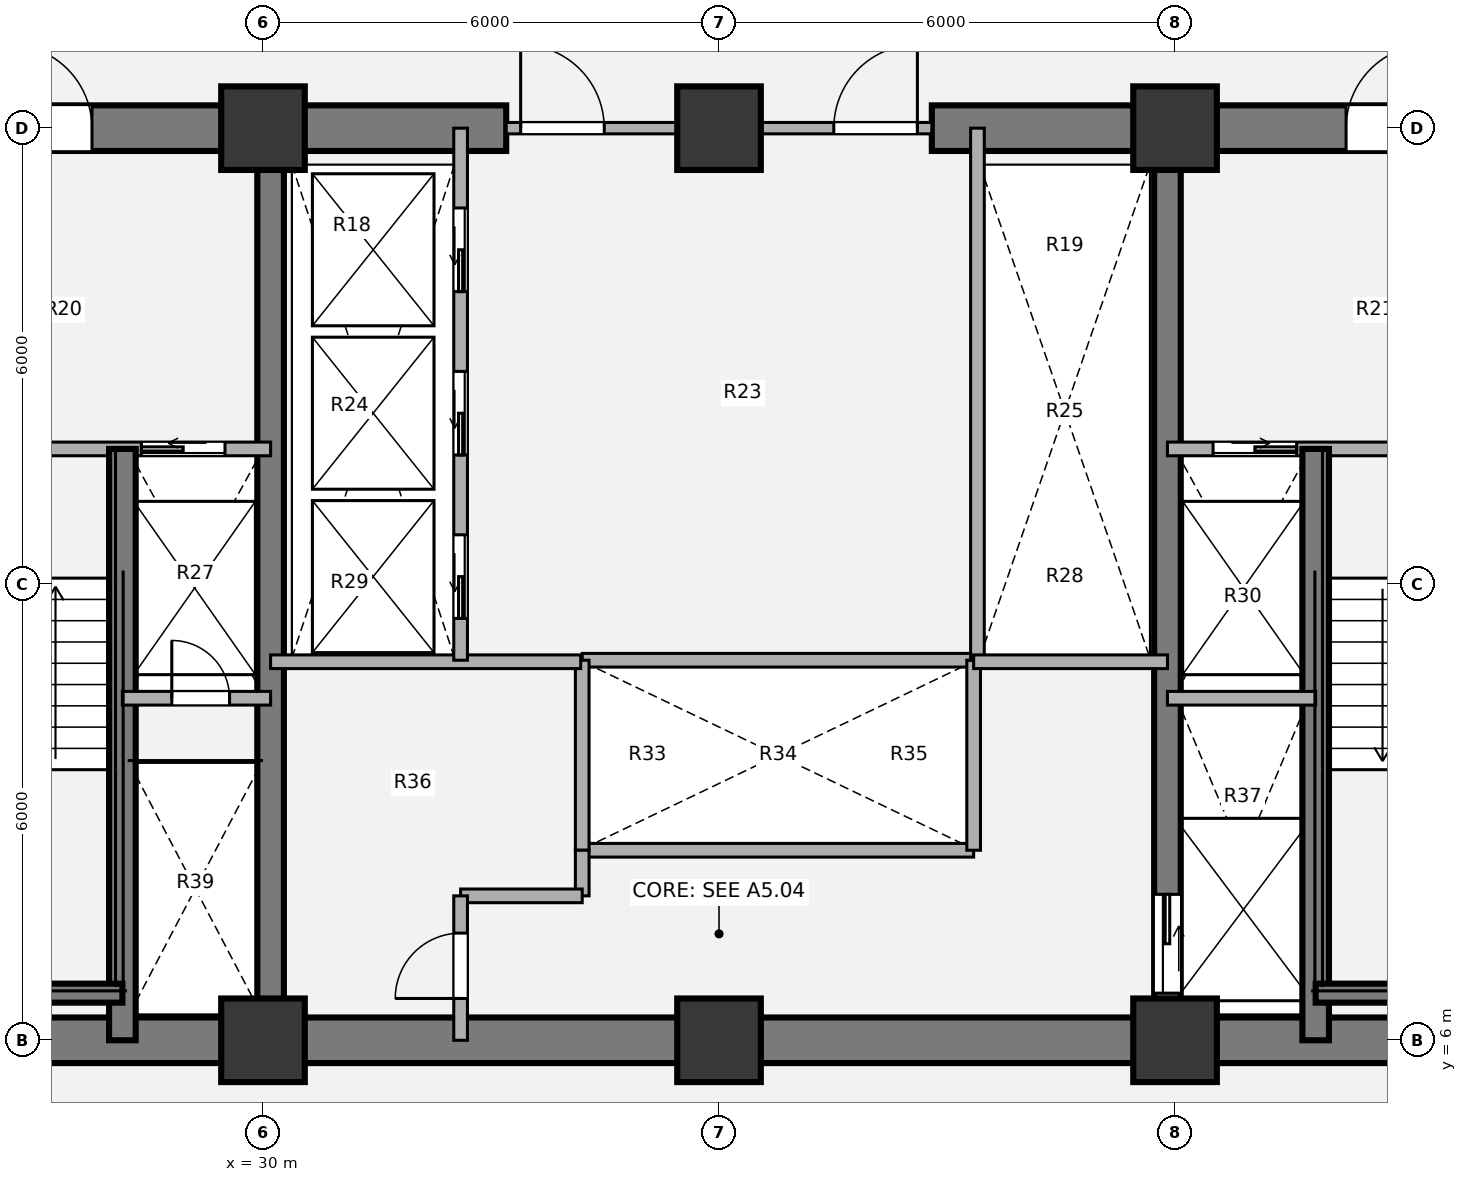
"""IFC4 building model, lengths in metres.
Left out: names, types, materials, properties, quantities, classifications, styles, units other than length and angle.
Written with IfcOpenShell. Run it as: python <this file> out.ifc"""

import sys

from ifc_helpers import new_model, si_unit, direction, frame, frame_2d, origin, origin_2d, place, context, subcontext, project, spatial, rectangle, extrude, source, transform, mapped, element, fill, save


model = new_model("IFC4")
c1 = context("Model", 3, precision=1e-05, world=origin(), true_north=direction((0.0, 1.0)))
c2 = subcontext(c1, "Body", "Model", "MODEL_VIEW")
j1 = project(units=[si_unit("LENGTHUNIT", "METRE"), si_unit("PLANEANGLEUNIT", "RADIAN")], contexts=[c1])
p1 = place(None, origin())
s1 = spatial("IfcSite", under=j1, at=p1, CompositionType="ELEMENT")
p2 = place(p1, origin())
s2 = spatial("IfcBuilding", under=s1, at=p2, CompositionType="ELEMENT")
p3 = place(p2, frame((0.0, 0.0, 76.14)))
s3 = spatial("IfcBuildingStorey", under=s2, at=p3, CompositionType="ELEMENT", Elevation=76.14)
m1 = source(origin(), c2, "Body", "SweptSolid", [
    extrude(rectangle(XDim=1.1, YDim=1.1, at=origin_2d()), origin(), (0.0, 0.0, 1.0), 3.78),
])
for number, where, z_axis, x_axis in (
    (1, (30.0, 6.0, 0.0), (0.0, 0.0, 1.0), (1.0, 0.0, 0.0)),
    (2, (36.0, 6.0, 0.0), (0.0, 0.0, 1.0), (1.0, 0.0, 0.0)),
    (3, (42.0, 6.0, 0.0), (0.0, 0.0, 1.0), (1.0, 0.0, 0.0)),
    (4, (30.0, 18.0, 0.0), (0.0, 0.0, 1.0), (1.0, 0.0, 0.0)),
    (5, (36.0, 18.0, 0.0), (0.0, 0.0, 1.0), (1.0, 0.0, 0.0)),
    (6, (42.0, 18.0, 0.0), (0.0, 0.0, 1.0), (1.0, 0.0, 0.0)),
):
    element("IfcColumn", number, at=place(p3, frame(where, z_axis=z_axis, x_axis=x_axis)), inside=s3, PredefinedType="COLUMN", context=c2, shape_type="MappedRepresentation", body=[
        mapped(m1, transform((0.0, 0.0, 0.0), x_axis=(1.0, 0.0, 0.0), y_axis=(0.0, 1.0, 0.0), z_axis=(0.0, 0.0, 1.0), scale=1.0)),
    ])
p4 = place(p3, frame((48.3, 6.0, 0.0), z_axis=(0.0, 0.0, 1.0), x_axis=(-1.0, 0.0, 0.0)))
e7 = element("IfcWall", 7, at=p4, inside=s3, PredefinedType="SHEAR", context=c2, shape_type="SweptSolid", body=[
    extrude(rectangle(XDim=24.6, YDim=0.6, at=frame_2d((12.3, 0.0))), origin(), (0.0, 0.0, 1.0), 3.78),
])
p5 = place(p3, frame((23.7, 18.0, 0.0), z_axis=(0.0, 0.0, 1.0), x_axis=(1.0, 0.0, 0.0)))
e8 = element("IfcWall", 8, at=p5, inside=s3, PredefinedType="SHEAR", context=c2, shape_type="SweptSolid", body=[
    extrude(rectangle(XDim=9.5, YDim=0.6, at=frame_2d((4.75, 0.0))), origin(), (0.0, 0.0, 1.0), 3.78),
])
p6 = place(p5, frame((2.95, 0.0, 0.0)))
e9 = element("IfcOpeningElement", 9, at=p6, cuts=e8, PredefinedType="OPENING", context=c2, shape_type="SweptSolid", body=[
    extrude(rectangle(XDim=1.1, YDim=2.1, at=origin_2d()), frame((0.55, 0.31, 1.05), z_axis=(0.0, -1.0, 0.0), x_axis=(1.0, 0.0, 0.0)), (0.0, 0.0, 1.0), 0.62),
])
p7 = place(p3, frame((38.8, 18.0, 0.0), z_axis=(0.0, 0.0, 1.0), x_axis=(1.0, 0.0, 0.0)))
e10 = element("IfcWall", 10, at=p7, inside=s3, PredefinedType="SHEAR", context=c2, shape_type="SweptSolid", body=[
    extrude(rectangle(XDim=9.5, YDim=0.6, at=frame_2d((4.75, 0.0))), origin(), (0.0, 0.0, 1.0), 3.78),
])
p8 = place(p7, frame((5.45, 0.0, 0.0)))
e11 = element("IfcOpeningElement", 11, at=p8, cuts=e10, PredefinedType="OPENING", context=c2, shape_type="SweptSolid", body=[
    extrude(rectangle(XDim=1.1, YDim=2.1, at=origin_2d()), frame((0.55, 0.31, 1.05), z_axis=(0.0, -1.0, 0.0), x_axis=(1.0, 0.0, 0.0)), (0.0, 0.0, 1.0), 0.62),
])
p9 = place(p3, frame((30.1, 6.0, 0.0), z_axis=(0.0, 0.0, 1.0), x_axis=(0.0, 1.0, 0.0)))
e12 = element("IfcWall", 12, at=p9, inside=s3, PredefinedType="SHEAR", context=c2, shape_type="SweptSolid", body=[
    extrude(rectangle(XDim=12.0, YDim=0.35, at=frame_2d((6.0, 0.0))), origin(), (0.0, 0.0, 1.0), 3.78),
])
p10 = place(p3, frame((41.9, 18.0, 0.0), z_axis=(0.0, 0.0, 1.0), x_axis=(0.0, -1.0, 0.0)))
e13 = element("IfcWall", 13, at=p10, inside=s3, PredefinedType="SHEAR", context=c2, shape_type="SweptSolid", body=[
    extrude(rectangle(XDim=12.0, YDim=0.35, at=frame_2d((6.0, 0.0))), origin(), (0.0, 0.0, 1.0), 3.78),
])
p11 = place(p10, frame((10.08, 0.0, 0.0)))
e14 = element("IfcOpeningElement", 14, at=p11, cuts=e13, PredefinedType="OPENING", context=c2, shape_type="SweptSolid", body=[
    extrude(rectangle(XDim=1.3, YDim=2.1, at=origin_2d()), frame((0.65, 0.185, 1.05), z_axis=(0.0, -1.0, 0.0), x_axis=(1.0, 0.0, 0.0)), (0.0, 0.0, 1.0), 0.37),
])
for number, where, z_axis, x_axis in (
    (15, (34.2, 11.0, 0.0), (0.0, 0.0, 1.0), (1.0, 0.0, 0.0)),
    (16, (34.2, 8.5, 0.0), (0.0, 0.0, 1.0), (1.0, 0.0, 0.0)),
):
    element("IfcWall", number, at=place(p3, frame(where, z_axis=z_axis, x_axis=x_axis)), inside=s3, PredefinedType="PARTITIONING", context=c2, shape_type="SweptSolid", body=[
        extrude(rectangle(XDim=5.15, YDim=0.18, at=frame_2d((2.575, 0.0))), origin(), (0.0, 0.0, 1.0), 3.342),
    ])
for number, where, z_axis, x_axis in (
    (17, (34.2, 8.5, 0.0), (0.0, 0.0, 1.0), (0.0, 1.0, 0.0)),
    (18, (39.35, 8.5, 0.0), (0.0, 0.0, 1.0), (0.0, 1.0, 0.0)),
):
    element("IfcWall", number, at=place(p3, frame(where, z_axis=z_axis, x_axis=x_axis)), inside=s3, PredefinedType="PARTITIONING", context=c2, shape_type="SweptSolid", body=[
        extrude(rectangle(XDim=2.5, YDim=0.18, at=frame_2d((1.25, 0.0))), origin(), (0.0, 0.0, 1.0), 3.342),
    ])
p12 = place(p3, frame((39.4, 11.0, 0.0), z_axis=(0.0, 0.0, 1.0), x_axis=(0.0, 1.0, 0.0)))
e19 = element("IfcWall", 19, at=p12, inside=s3, PredefinedType="PARTITIONING", context=c2, shape_type="SweptSolid", body=[
    extrude(rectangle(XDim=7.0, YDim=0.18, at=frame_2d((3.5, 0.0))), origin(), (0.0, 0.0, 1.0), 3.342),
])
p13 = place(p3, frame((30.1, 10.98, 0.0), z_axis=(0.0, 0.0, 1.0), x_axis=(1.0, 0.0, 0.0)))
e20 = element("IfcWall", 20, at=p13, inside=s3, PredefinedType="PARTITIONING", context=c2, shape_type="SweptSolid", body=[
    extrude(rectangle(XDim=4.08, YDim=0.18, at=frame_2d((2.04, 0.0))), origin(), (0.0, 0.0, 1.0), 3.342),
])
p14 = place(p3, frame((34.2, 7.9, 0.0), z_axis=(0.0, 0.0, 1.0), x_axis=(0.0, 1.0, 0.0)))
e21 = element("IfcWall", 21, at=p14, inside=s3, PredefinedType="PARTITIONING", context=c2, shape_type="SweptSolid", body=[
    extrude(rectangle(XDim=0.6, YDim=0.18, at=frame_2d((0.3, 0.0))), origin(), (0.0, 0.0, 1.0), 3.342),
])
p15 = place(p3, frame((32.6, 7.9, 0.0), z_axis=(0.0, 0.0, 1.0), x_axis=(1.0, 0.0, 0.0)))
e22 = element("IfcWall", 22, at=p15, inside=s3, PredefinedType="PARTITIONING", context=c2, shape_type="SweptSolid", body=[
    extrude(rectangle(XDim=1.6, YDim=0.18, at=frame_2d((0.8, 0.0))), origin(), (0.0, 0.0, 1.0), 3.342),
])
p16 = place(p3, frame((32.6, 6.0, 0.0), z_axis=(0.0, 0.0, 1.0), x_axis=(0.0, 1.0, 0.0)))
e23 = element("IfcWall", 23, at=p16, inside=s3, PredefinedType="PARTITIONING", context=c2, shape_type="SweptSolid", body=[
    extrude(rectangle(XDim=1.9, YDim=0.18, at=frame_2d((0.95, 0.0))), origin(), (0.0, 0.0, 1.0), 3.342),
])
p17 = place(p16, frame((0.55, 0.0, 0.0)))
e24 = element("IfcOpeningElement", 24, at=p17, cuts=e23, PredefinedType="OPENING", context=c2, shape_type="SweptSolid", body=[
    extrude(rectangle(XDim=0.86, YDim=2.1, at=origin_2d()), frame((0.43, 0.1, 1.05), z_axis=(0.0, -1.0, 0.0), x_axis=(1.0, 0.0, 0.0)), (0.0, 0.0, 1.0), 0.2),
])
p18 = place(p3, frame((39.35, 10.98, 0.0), z_axis=(0.0, 0.0, 1.0), x_axis=(1.0, 0.0, 0.0)))
e25 = element("IfcWall", 25, at=p18, inside=s3, PredefinedType="PARTITIONING", context=c2, shape_type="SweptSolid", body=[
    extrude(rectangle(XDim=2.55, YDim=0.18, at=frame_2d((1.275, 0.0))), origin(), (0.0, 0.0, 1.0), 3.342),
])
p19 = place(p3, frame((33.2, 18.0, 0.0), z_axis=(0.0, 0.0, 1.0), x_axis=(1.0, 0.0, 0.0)))
e26 = element("IfcWall", 26, at=p19, inside=s3, PredefinedType="PARTITIONING", context=c2, shape_type="SweptSolid", body=[
    extrude(rectangle(XDim=5.6, YDim=0.15, at=frame_2d((2.8, 0.0))), origin(), (0.0, 0.0, 1.0), 2.157),
])
p20 = place(p19, frame((0.19, 0.0, 0.0)))
e27 = element("IfcOpeningElement", 27, at=p20, cuts=e26, PredefinedType="OPENING", context=c2, shape_type="SweptSolid", body=[
    extrude(rectangle(XDim=1.1, YDim=2.097, at=origin_2d()), frame((0.55, 0.085, 1.048), z_axis=(0.0, -1.0, 0.0), x_axis=(1.0, 0.0, 0.0)), (0.0, 0.0, 1.0), 0.17),
])
p21 = place(p19, frame((4.31, 0.0, 0.0)))
e28 = element("IfcOpeningElement", 28, at=p21, cuts=e26, PredefinedType="OPENING", context=c2, shape_type="SweptSolid", body=[
    extrude(rectangle(XDim=1.1, YDim=2.097, at=origin_2d()), frame((0.55, 0.085, 1.048), z_axis=(0.0, -1.0, 0.0), x_axis=(1.0, 0.0, 0.0)), (0.0, 0.0, 1.0), 0.17),
])
p22 = place(p3, frame((24.0, 13.78, 0.0), z_axis=(0.0, 0.0, 1.0), x_axis=(1.0, 0.0, 0.0)))
e29 = element("IfcWall", 29, at=p22, inside=s3, PredefinedType="PARTITIONING", context=c2, shape_type="SweptSolid", body=[
    extrude(rectangle(XDim=6.1, YDim=0.18, at=frame_2d((3.05, 0.0))), origin(), (0.0, 0.0, 1.0), 3.342),
])
p23 = place(p22, frame((1.15, 0.0, 0.0)))
e30 = element("IfcOpeningElement", 30, at=p23, cuts=e29, PredefinedType="OPENING", context=c2, shape_type="SweptSolid", body=[
    extrude(rectangle(XDim=1.1, YDim=2.1, at=origin_2d()), frame((0.55, 0.1, 1.05), z_axis=(0.0, -1.0, 0.0), x_axis=(1.0, 0.0, 0.0)), (0.0, 0.0, 1.0), 0.2),
])
p24 = place(p22, frame((4.4, 0.0, 0.0)))
e31 = element("IfcOpeningElement", 31, at=p24, cuts=e29, PredefinedType="OPENING", context=c2, shape_type="SweptSolid", body=[
    extrude(rectangle(XDim=1.1, YDim=2.1, at=origin_2d()), frame((0.55, 0.1, 1.05), z_axis=(0.0, -1.0, 0.0), x_axis=(1.0, 0.0, 0.0)), (0.0, 0.0, 1.0), 0.2),
])
p25 = place(p3, frame((28.15, 6.0, 0.0), z_axis=(0.0, 0.0, 1.0), x_axis=(0.0, 1.0, 0.0)))
e32 = element("IfcWall", 32, at=p25, inside=s3, PredefinedType="SHEAR", context=c2, shape_type="SweptSolid", body=[
    extrude(rectangle(XDim=7.78, YDim=0.35, at=frame_2d((3.89, 0.0))), origin(), (0.0, 0.0, 1.0), 3.692),
])
p26 = place(p3, frame((24.58, 6.62, 0.0), z_axis=(0.0, 0.0, 1.0), x_axis=(1.0, 0.0, 0.0)))
e33 = element("IfcWall", 33, at=p26, inside=s3, PredefinedType="SHEAR", context=c2, shape_type="SweptSolid", body=[
    extrude(rectangle(XDim=3.57, YDim=0.25, at=frame_2d((1.785, 0.0))), origin(), (0.0, 0.0, 1.0), 3.692),
])
p27 = place(p3, frame((28.15, 10.5, 0.0), z_axis=(0.0, 0.0, 1.0), x_axis=(1.0, 0.0, 0.0)))
e34 = element("IfcWall", 34, at=p27, inside=s3, PredefinedType="PARTITIONING", context=c2, shape_type="SweptSolid", body=[
    extrude(rectangle(XDim=1.95, YDim=0.18, at=frame_2d((0.975, 0.0))), origin(), (0.0, 0.0, 1.0), 3.342),
])
p28 = place(p27, frame((0.65, 0.0, 0.0)))
e35 = element("IfcOpeningElement", 35, at=p28, cuts=e34, PredefinedType="OPENING", context=c2, shape_type="SweptSolid", body=[
    extrude(rectangle(XDim=0.76, YDim=2.05, at=origin_2d()), frame((0.38, 0.1, 1.025), z_axis=(0.0, -1.0, 0.0), x_axis=(1.0, 0.0, 0.0)), (0.0, 0.0, 1.0), 0.2),
])
p29 = place(p3, frame((41.9, 13.78, 0.0), z_axis=(0.0, 0.0, 1.0), x_axis=(1.0, 0.0, 0.0)))
e36 = element("IfcWall", 36, at=p29, inside=s3, PredefinedType="PARTITIONING", context=c2, shape_type="SweptSolid", body=[
    extrude(rectangle(XDim=6.1, YDim=0.18, at=frame_2d((3.05, 0.0))), origin(), (0.0, 0.0, 1.0), 3.342),
])
p30 = place(p29, frame((0.6, 0.0, 0.0)))
e37 = element("IfcOpeningElement", 37, at=p30, cuts=e36, PredefinedType="OPENING", context=c2, shape_type="SweptSolid", body=[
    extrude(rectangle(XDim=1.1, YDim=2.1, at=origin_2d()), frame((0.55, 0.1, 1.05), z_axis=(0.0, -1.0, 0.0), x_axis=(1.0, 0.0, 0.0)), (0.0, 0.0, 1.0), 0.2),
])
p31 = place(p29, frame((3.8, 0.0, 0.0)))
e38 = element("IfcOpeningElement", 38, at=p31, cuts=e36, PredefinedType="OPENING", context=c2, shape_type="SweptSolid", body=[
    extrude(rectangle(XDim=1.1, YDim=2.1, at=origin_2d()), frame((0.55, 0.1, 1.05), z_axis=(0.0, -1.0, 0.0), x_axis=(1.0, 0.0, 0.0)), (0.0, 0.0, 1.0), 0.2),
])
p32 = place(p3, frame((43.85, 6.0, 0.0), z_axis=(0.0, 0.0, 1.0), x_axis=(0.0, 1.0, 0.0)))
e39 = element("IfcWall", 39, at=p32, inside=s3, PredefinedType="SHEAR", context=c2, shape_type="SweptSolid", body=[
    extrude(rectangle(XDim=7.78, YDim=0.35, at=frame_2d((3.89, 0.0))), origin(), (0.0, 0.0, 1.0), 3.692),
])
p33 = place(p3, frame((43.85, 6.62, 0.0), z_axis=(0.0, 0.0, 1.0), x_axis=(1.0, 0.0, 0.0)))
e40 = element("IfcWall", 40, at=p33, inside=s3, PredefinedType="SHEAR", context=c2, shape_type="SweptSolid", body=[
    extrude(rectangle(XDim=3.57, YDim=0.25, at=frame_2d((1.785, 0.0))), origin(), (0.0, 0.0, 1.0), 3.692),
])
p34 = place(p3, frame((41.9, 10.5, 0.0), z_axis=(0.0, 0.0, 1.0), x_axis=(1.0, 0.0, 0.0)))
e41 = element("IfcWall", 41, at=p34, inside=s3, PredefinedType="PARTITIONING", context=c2, shape_type="SweptSolid", body=[
    extrude(rectangle(XDim=1.95, YDim=0.18, at=frame_2d((0.975, 0.0))), origin(), (0.0, 0.0, 1.0), 3.342),
])
p35 = place(p3, frame((32.6, 11.0, 0.0), z_axis=(0.0, 0.0, 1.0), x_axis=(0.0, 1.0, 0.0)))
e42 = element("IfcWall", 42, at=p35, inside=s3, PredefinedType="PARTITIONING", context=c2, shape_type="SweptSolid", body=[
    extrude(rectangle(XDim=7.0, YDim=0.18, at=frame_2d((3.5, 0.0))), origin(), (0.0, 0.0, 1.0), 3.342),
])
p36 = place(p35, frame((0.55, 0.0, 0.0)))
e43 = element("IfcOpeningElement", 43, at=p36, cuts=e42, PredefinedType="OPENING", context=c2, shape_type="SweptSolid", body=[
    extrude(rectangle(XDim=1.1, YDim=2.1, at=origin_2d()), frame((0.55, 0.1, 1.05), z_axis=(0.0, -1.0, 0.0), x_axis=(1.0, 0.0, 0.0)), (0.0, 0.0, 1.0), 0.2),
])
p37 = place(p35, frame((2.7, 0.0, 0.0)))
e44 = element("IfcOpeningElement", 44, at=p37, cuts=e42, PredefinedType="OPENING", context=c2, shape_type="SweptSolid", body=[
    extrude(rectangle(XDim=1.1, YDim=2.1, at=origin_2d()), frame((0.55, 0.1, 1.05), z_axis=(0.0, -1.0, 0.0), x_axis=(1.0, 0.0, 0.0)), (0.0, 0.0, 1.0), 0.2),
])
p38 = place(p35, frame((4.85, 0.0, 0.0)))
e45 = element("IfcOpeningElement", 45, at=p38, cuts=e42, PredefinedType="OPENING", context=c2, shape_type="SweptSolid", body=[
    extrude(rectangle(XDim=1.1, YDim=2.1, at=origin_2d()), frame((0.55, 0.1, 1.05), z_axis=(0.0, -1.0, 0.0), x_axis=(1.0, 0.0, 0.0)), (0.0, 0.0, 1.0), 0.2),
])
m2 = source(origin(), c2, "Body", "SweptSolid", [
    extrude(rectangle(XDim=0.86, YDim=2.1, at=origin_2d()), frame((0.43, 0.025, 1.05), z_axis=(0.0, -1.0, 0.0), x_axis=(1.0, 0.0, 0.0)), (0.0, 0.0, 1.0), 0.05),
])
p39 = place(p17, origin())
e46 = element("IfcDoor", 46, at=p39, inside=s3, OperationType="SINGLE_SWING_LEFT", PredefinedType="DOOR", context=c2, shape_type="MappedRepresentation", body=[
    mapped(m2, transform((0.0, 0.0, 0.0), x_axis=(1.0, 0.0, 0.0), y_axis=(0.0, 1.0, 0.0), z_axis=(0.0, 0.0, 1.0), scale=1.0)),
])
fill(e24, e46)
m3 = source(origin(), c2, "Body", "SweptSolid", [
    extrude(rectangle(XDim=1.1, YDim=2.097, at=origin_2d()), frame((0.55, 0.025, 1.048), z_axis=(0.0, -1.0, 0.0), x_axis=(1.0, 0.0, 0.0)), (0.0, 0.0, 1.0), 0.05),
])
p40 = place(p20, origin())
e47 = element("IfcDoor", 47, at=p40, inside=s3, OperationType="SINGLE_SWING_LEFT", PredefinedType="DOOR", context=c2, shape_type="MappedRepresentation", body=[
    mapped(m3, transform((0.0, 0.0, 0.0), x_axis=(1.0, 0.0, 0.0), y_axis=(0.0, 1.0, 0.0), z_axis=(0.0, 0.0, 1.0), scale=1.0)),
])
fill(e27, e47)
p41 = place(p21, origin())
e48 = element("IfcDoor", 48, at=p41, inside=s3, OperationType="SINGLE_SWING_RIGHT", PredefinedType="DOOR", context=c2, shape_type="MappedRepresentation", body=[
    mapped(m3, transform((0.0, 0.0, 0.0), x_axis=(1.0, 0.0, 0.0), y_axis=(0.0, 1.0, 0.0), z_axis=(0.0, 0.0, 1.0), scale=1.0)),
])
fill(e28, e48)
m4 = source(origin(), c2, "Body", "SweptSolid", [
    extrude(rectangle(XDim=1.1, YDim=2.1, at=origin_2d()), frame((0.55, 0.025, 1.05), z_axis=(0.0, -1.0, 0.0), x_axis=(1.0, 0.0, 0.0)), (0.0, 0.0, 1.0), 0.05),
])
p42 = place(p24, origin())
e49 = element("IfcDoor", 49, at=p42, inside=s3, OperationType="SLIDING_TO_LEFT", PredefinedType="DOOR", context=c2, shape_type="MappedRepresentation", body=[
    mapped(m4, transform((0.0, 0.0, 0.0), x_axis=(1.0, 0.0, 0.0), y_axis=(0.0, 1.0, 0.0), z_axis=(0.0, 0.0, 1.0), scale=1.0)),
])
fill(e31, e49)
m5 = source(origin(), c2, "Body", "SweptSolid", [
    extrude(rectangle(XDim=0.76, YDim=2.05, at=origin_2d()), frame((0.38, 0.025, 1.025), z_axis=(0.0, -1.0, 0.0), x_axis=(1.0, 0.0, 0.0)), (0.0, 0.0, 1.0), 0.05),
])
p43 = place(p28, origin())
e50 = element("IfcDoor", 50, at=p43, inside=s3, OperationType="SINGLE_SWING_LEFT", PredefinedType="DOOR", context=c2, shape_type="MappedRepresentation", body=[
    mapped(m5, transform((0.0, 0.0, 0.0), x_axis=(1.0, 0.0, 0.0), y_axis=(0.0, 1.0, 0.0), z_axis=(0.0, 0.0, 1.0), scale=1.0)),
])
fill(e35, e50)
p44 = place(p30, origin())
e51 = element("IfcDoor", 51, at=p44, inside=s3, OperationType="SLIDING_TO_RIGHT", PredefinedType="DOOR", context=c2, shape_type="MappedRepresentation", body=[
    mapped(m4, transform((0.0, 0.0, 0.0), x_axis=(1.0, 0.0, 0.0), y_axis=(0.0, 1.0, 0.0), z_axis=(0.0, 0.0, 1.0), scale=1.0)),
])
fill(e37, e51)
m6 = source(origin(), c2, "Body", "SweptSolid", [
    extrude(rectangle(XDim=1.3, YDim=2.1, at=origin_2d()), frame((0.65, 0.025, 1.05), z_axis=(0.0, -1.0, 0.0), x_axis=(1.0, 0.0, 0.0)), (0.0, 0.0, 1.0), 0.05),
])
p45 = place(p11, origin())
e52 = element("IfcDoor", 52, at=p45, inside=s3, OperationType="SLIDING_TO_LEFT", PredefinedType="DOOR", context=c2, shape_type="MappedRepresentation", body=[
    mapped(m6, transform((0.0, 0.0, 0.0), x_axis=(1.0, 0.0, 0.0), y_axis=(0.0, 1.0, 0.0), z_axis=(0.0, 0.0, 1.0), scale=1.0)),
])
fill(e14, e52)
m7 = source(origin(), c2, "Body", "SweptSolid", [
    extrude(rectangle(XDim=1.1, YDim=2.1, at=origin_2d()), frame((0.55, 0.025, 1.05), z_axis=(0.0, -1.0, 0.0), x_axis=(1.0, 0.0, 0.0)), (0.0, 0.0, 1.0), 0.05),
])
p46 = place(p6, origin())
e53 = element("IfcDoor", 53, at=p46, inside=s3, OperationType="SINGLE_SWING_LEFT", PredefinedType="DOOR", context=c2, shape_type="MappedRepresentation", body=[
    mapped(m7, transform((0.0, 0.0, 0.0), x_axis=(1.0, 0.0, 0.0), y_axis=(0.0, 1.0, 0.0), z_axis=(0.0, 0.0, 1.0), scale=1.0)),
])
fill(e9, e53)
p47 = place(p8, origin())
e54 = element("IfcDoor", 54, at=p47, inside=s3, OperationType="SINGLE_SWING_RIGHT", PredefinedType="DOOR", context=c2, shape_type="MappedRepresentation", body=[
    mapped(m7, transform((0.0, 0.0, 0.0), x_axis=(1.0, 0.0, 0.0), y_axis=(0.0, 1.0, 0.0), z_axis=(0.0, 0.0, 1.0), scale=1.0)),
])
fill(e11, e54)
p48 = place(p36, origin())
e55 = element("IfcDoor", 55, at=p48, inside=s3, OperationType="SLIDING_TO_LEFT", PredefinedType="DOOR", context=c2, shape_type="MappedRepresentation", body=[
    mapped(m4, transform((0.0, 0.0, 0.0), x_axis=(1.0, 0.0, 0.0), y_axis=(0.0, 1.0, 0.0), z_axis=(0.0, 0.0, 1.0), scale=1.0)),
])
fill(e43, e55)
p49 = place(p37, origin())
e56 = element("IfcDoor", 56, at=p49, inside=s3, OperationType="SLIDING_TO_LEFT", PredefinedType="DOOR", context=c2, shape_type="MappedRepresentation", body=[
    mapped(m4, transform((0.0, 0.0, 0.0), x_axis=(1.0, 0.0, 0.0), y_axis=(0.0, 1.0, 0.0), z_axis=(0.0, 0.0, 1.0), scale=1.0)),
])
fill(e44, e56)
p50 = place(p38, origin())
e57 = element("IfcDoor", 57, at=p50, inside=s3, OperationType="SLIDING_TO_LEFT", PredefinedType="DOOR", context=c2, shape_type="MappedRepresentation", body=[
    mapped(m4, transform((0.0, 0.0, 0.0), x_axis=(1.0, 0.0, 0.0), y_axis=(0.0, 1.0, 0.0), z_axis=(0.0, 0.0, 1.0), scale=1.0)),
])
fill(e45, e57)
save(model, sys.argv[1])
